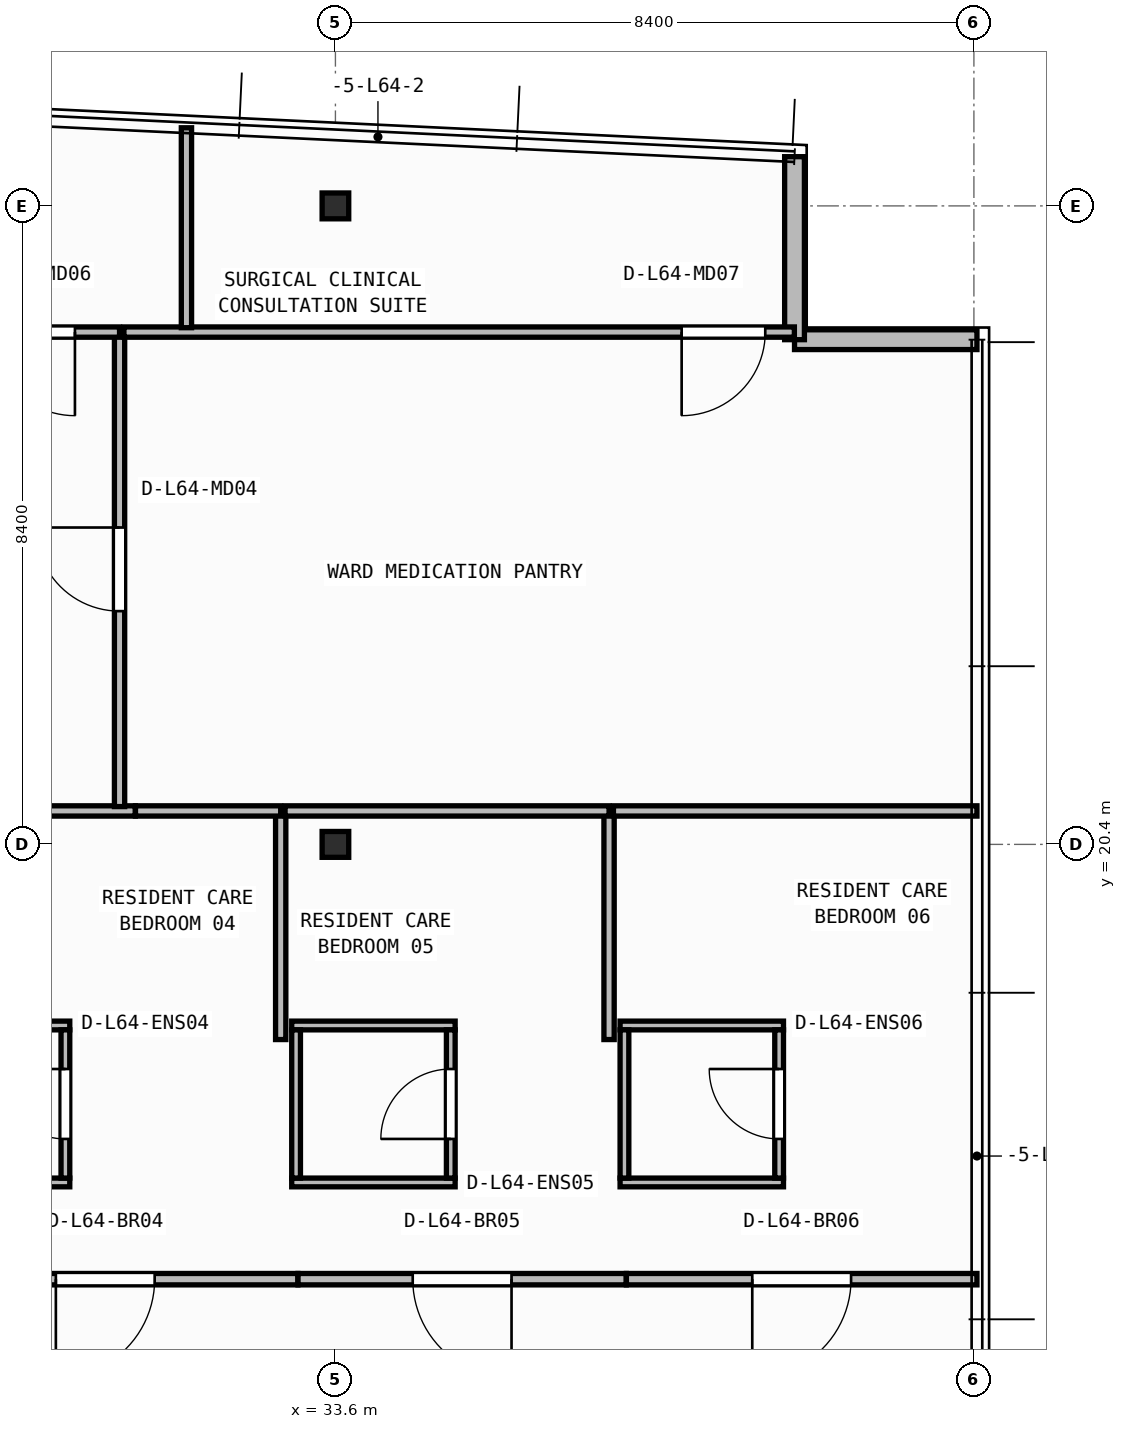
"""IFC4 building model, lengths in metres.
Left out: names, types, materials, properties, quantities, classifications, styles, units other than length and angle.
Written with IfcOpenShell. Run it as: python <this file> out.ifc"""

import sys

from ifc_helpers import new_model, si_unit, direction, frame, frame_2d, origin, origin_2d, place, context, subcontext, project, spatial, rectangle, i_section, extrude, element, fill, save


model = new_model("IFC4")
c1 = context("Model", 3, precision=1e-05, world=origin(), true_north=direction((0.0, 1.0)))
c2 = subcontext(c1, "Body", "Model", "MODEL_VIEW")
j1 = project(units=[si_unit("LENGTHUNIT", "METRE"), si_unit("PLANEANGLEUNIT", "RADIAN")], contexts=[c1])
p1 = place(None, origin())
s1 = spatial("IfcSite", under=j1, at=p1, CompositionType="ELEMENT")
p2 = place(p1, origin())
s2 = spatial("IfcBuilding", under=s1, at=p2, CompositionType="ELEMENT")
p3 = place(p2, frame((0.0, 0.0, 260.5)))
s3 = spatial("IfcBuildingStorey", under=s2, at=p3, CompositionType="ELEMENT", Elevation=260.5)
for number, where, z_axis, x_axis in (
    (1, (33.6, 20.4, 0.0), (0.0, 0.0, 1.0), (1.0, 0.0, 0.0)),
    (2, (33.6, 28.8, 0.0), (0.0, 0.0, 1.0), (1.0, 0.0, 0.0)),
):
    element("IfcColumn", number, at=place(p3, frame(where, z_axis=z_axis, x_axis=x_axis)), inside=s3, PredefinedType="COLUMN", context=c2, shape_type="SweptSolid", body=[
        extrude(i_section(OverallWidth=0.35, OverallDepth=0.34, WebThickness=0.016, FlangeThickness=0.028, at=origin_2d()), origin(), (0.0, 0.0, 1.0), 3.95),
    ])
p4 = place(p3, frame((42.04, 27.04, 0.0), z_axis=(0.0, 0.0, 1.0), x_axis=(-1.0, 0.0, 0.0)))
e3 = element("IfcWall", 3, at=p4, inside=s3, PredefinedType="STANDARD", context=c2, shape_type="SweptSolid", body=[
    extrude(rectangle(XDim=2.4, YDim=0.26, at=frame_2d((1.2, 0.0))), origin(), (0.0, 0.0, 1.0), 3.71),
])
p5 = place(p3, frame((39.64, 27.04, 0.0), z_axis=(0.0, 0.0, 1.0), x_axis=(0.0, 1.0, 0.0)))
e4 = element("IfcWall", 4, at=p5, inside=s3, PredefinedType="STANDARD", context=c2, shape_type="SweptSolid", body=[
    extrude(rectangle(XDim=2.407, YDim=0.26, at=frame_2d((1.204, 0.0))), origin(), (0.0, 0.0, 1.0), 3.71),
])
p6 = place(p3, frame((27.955, 15.952, 0.0), z_axis=(0.0, 0.0, 1.0), x_axis=(1.0, 0.0, 0.0)))
e5 = element("IfcWall", 5, at=p6, inside=s3, PredefinedType="PARTITIONING", context=c2, shape_type="SweptSolid", body=[
    extrude(rectangle(XDim=2.15, YDim=0.115, at=frame_2d((1.075, 0.0))), origin(), (0.0, 0.0, 1.0), 3.429),
])
p7 = place(p3, frame((27.955, 18.018, 0.0), z_axis=(0.0, 0.0, 1.0), x_axis=(1.0, 0.0, 0.0)))
e6 = element("IfcWall", 6, at=p7, inside=s3, PredefinedType="PARTITIONING", context=c2, shape_type="SweptSolid", body=[
    extrude(rectangle(XDim=2.15, YDim=0.115, at=frame_2d((1.075, 0.0))), origin(), (0.0, 0.0, 1.0), 3.71),
])
p8 = place(p3, frame((30.048, 16.01, 0.0), z_axis=(0.0, 0.0, 1.0), x_axis=(0.0, 1.0, 0.0)))
e7 = element("IfcWall", 7, at=p8, inside=s3, PredefinedType="PARTITIONING", context=c2, shape_type="SweptSolid", body=[
    extrude(rectangle(XDim=1.95, YDim=0.115, at=frame_2d((0.975, 0.0))), origin(), (0.0, 0.0, 1.0), 3.71),
])
p9 = place(p8, frame((0.515, 0.0, 0.0)))
e8 = element("IfcOpeningElement", 8, at=p9, cuts=e7, PredefinedType="OPENING", context=c2, shape_type="SweptSolid", body=[
    extrude(rectangle(XDim=0.92, YDim=2.1, at=frame_2d((0.46, 1.05))), frame((0.0, 0.067, 0.0), z_axis=(0.0, -1.0, 0.0), x_axis=(1.0, 0.0, 0.0)), (0.0, 0.0, 1.0), 0.135),
])
p10 = place(p3, frame((33.025, 15.952, 0.0), z_axis=(0.0, 0.0, 1.0), x_axis=(1.0, 0.0, 0.0)))
e9 = element("IfcWall", 9, at=p10, inside=s3, PredefinedType="PARTITIONING", context=c2, shape_type="SweptSolid", body=[
    extrude(rectangle(XDim=2.15, YDim=0.115, at=frame_2d((1.075, 0.0))), origin(), (0.0, 0.0, 1.0), 3.429),
])
p11 = place(p3, frame((33.025, 18.018, 0.0), z_axis=(0.0, 0.0, 1.0), x_axis=(1.0, 0.0, 0.0)))
e10 = element("IfcWall", 10, at=p11, inside=s3, PredefinedType="PARTITIONING", context=c2, shape_type="SweptSolid", body=[
    extrude(rectangle(XDim=2.15, YDim=0.115, at=frame_2d((1.075, 0.0))), origin(), (0.0, 0.0, 1.0), 3.71),
])
p12 = place(p3, frame((33.083, 16.01, 0.0), z_axis=(0.0, 0.0, 1.0), x_axis=(0.0, 1.0, 0.0)))
e11 = element("IfcWall", 11, at=p12, inside=s3, PredefinedType="PARTITIONING", context=c2, shape_type="SweptSolid", body=[
    extrude(rectangle(XDim=1.95, YDim=0.115, at=frame_2d((0.975, 0.0))), origin(), (0.0, 0.0, 1.0), 3.71),
])
p13 = place(p3, frame((35.117, 16.01, 0.0), z_axis=(0.0, 0.0, 1.0), x_axis=(0.0, 1.0, 0.0)))
e12 = element("IfcWall", 12, at=p13, inside=s3, PredefinedType="PARTITIONING", context=c2, shape_type="SweptSolid", body=[
    extrude(rectangle(XDim=1.95, YDim=0.115, at=frame_2d((0.975, 0.0))), origin(), (0.0, 0.0, 1.0), 3.71),
])
p14 = place(p13, frame((0.515, 0.0, 0.0)))
e13 = element("IfcOpeningElement", 13, at=p14, cuts=e12, PredefinedType="OPENING", context=c2, shape_type="SweptSolid", body=[
    extrude(rectangle(XDim=0.92, YDim=2.1, at=frame_2d((0.46, 1.05))), frame((0.0, 0.067, 0.0), z_axis=(0.0, -1.0, 0.0), x_axis=(1.0, 0.0, 0.0)), (0.0, 0.0, 1.0), 0.135),
])
for number, where, z_axis, x_axis in (
    (14, (37.345, 15.952, 0.0), (0.0, 0.0, 1.0), (1.0, 0.0, 0.0)),
    (15, (37.345, 18.018, 0.0), (0.0, 0.0, 1.0), (1.0, 0.0, 0.0)),
):
    element("IfcWall", number, at=place(p3, frame(where, z_axis=z_axis, x_axis=x_axis)), inside=s3, PredefinedType="PARTITIONING", context=c2, shape_type="SweptSolid", body=[
        extrude(rectangle(XDim=2.15, YDim=0.115, at=frame_2d((1.075, 0.0))), origin(), (0.0, 0.0, 1.0), 3.71),
    ])
p15 = place(p3, frame((37.403, 16.01, 0.0), z_axis=(0.0, 0.0, 1.0), x_axis=(0.0, 1.0, 0.0)))
e16 = element("IfcWall", 16, at=p15, inside=s3, PredefinedType="PARTITIONING", context=c2, shape_type="SweptSolid", body=[
    extrude(rectangle(XDim=1.95, YDim=0.115, at=frame_2d((0.975, 0.0))), origin(), (0.0, 0.0, 1.0), 3.71),
])
p16 = place(p3, frame((39.438, 16.01, 0.0), z_axis=(0.0, 0.0, 1.0), x_axis=(0.0, 1.0, 0.0)))
e17 = element("IfcWall", 17, at=p16, inside=s3, PredefinedType="PARTITIONING", context=c2, shape_type="SweptSolid", body=[
    extrude(rectangle(XDim=1.95, YDim=0.115, at=frame_2d((0.975, 0.0))), origin(), (0.0, 0.0, 1.0), 3.71),
])
p17 = place(p16, frame((0.515, 0.0, 0.0)))
e18 = element("IfcOpeningElement", 18, at=p17, cuts=e17, PredefinedType="OPENING", context=c2, shape_type="SweptSolid", body=[
    extrude(rectangle(XDim=0.92, YDim=2.1, at=frame_2d((0.46, 1.05))), frame((0.0, 0.067, 0.0), z_axis=(0.0, -1.0, 0.0), x_axis=(1.0, 0.0, 0.0)), (0.0, 0.0, 1.0), 0.135),
])
p18 = place(p3, frame((33.106, 14.68, 0.0), z_axis=(0.0, 0.0, 1.0), x_axis=(-1.0, 0.0, 0.0)))
e19 = element("IfcWall", 19, at=p18, inside=s3, PredefinedType="PARTITIONING", context=c2, shape_type="SweptSolid", body=[
    extrude(rectangle(XDim=5.068, YDim=0.15, at=frame_2d((2.534, 0.0))), origin(), (0.0, 0.0, 1.0), 3.71),
])
p19 = place(p18, frame((1.884, 0.0, 0.0)))
e20 = element("IfcOpeningElement", 20, at=p19, cuts=e19, PredefinedType="OPENING", context=c2, shape_type="SweptSolid", body=[
    extrude(rectangle(XDim=1.3, YDim=2.15, at=frame_2d((0.65, 1.075))), frame((0.0, 0.085, 0.0), z_axis=(0.0, -1.0, 0.0), x_axis=(1.0, 0.0, 0.0)), (0.0, 0.0, 1.0), 0.17),
])
p20 = place(p3, frame((37.426, 14.68, 0.0), z_axis=(0.0, 0.0, 1.0), x_axis=(-1.0, 0.0, 0.0)))
e21 = element("IfcWall", 21, at=p20, inside=s3, PredefinedType="PARTITIONING", context=c2, shape_type="SweptSolid", body=[
    extrude(rectangle(XDim=4.318, YDim=0.15, at=frame_2d((2.159, 0.0))), origin(), (0.0, 0.0, 1.0), 3.71),
])
p21 = place(p20, frame((1.509, 0.0, 0.0)))
e22 = element("IfcOpeningElement", 22, at=p21, cuts=e21, PredefinedType="OPENING", context=c2, shape_type="SweptSolid", body=[
    extrude(rectangle(XDim=1.3, YDim=2.15, at=frame_2d((0.65, 1.075))), frame((0.0, 0.085, 0.0), z_axis=(0.0, -1.0, 0.0), x_axis=(1.0, 0.0, 0.0)), (0.0, 0.0, 1.0), 0.17),
])
p22 = place(p3, frame((42.04, 14.68, 0.0), z_axis=(0.0, 0.0, 1.0), x_axis=(-1.0, 0.0, 0.0)))
e23 = element("IfcWall", 23, at=p22, inside=s3, PredefinedType="PARTITIONING", context=c2, shape_type="SweptSolid", body=[
    extrude(rectangle(XDim=4.612, YDim=0.15, at=frame_2d((2.306, 0.0))), origin(), (0.0, 0.0, 1.0), 3.71),
])
p23 = place(p22, frame((1.656, 0.0, 0.0)))
e24 = element("IfcOpeningElement", 24, at=p23, cuts=e23, PredefinedType="OPENING", context=c2, shape_type="SweptSolid", body=[
    extrude(rectangle(XDim=1.3, YDim=2.15, at=frame_2d((0.65, 1.075))), frame((0.0, 0.085, 0.0), z_axis=(0.0, -1.0, 0.0), x_axis=(1.0, 0.0, 0.0)), (0.0, 0.0, 1.0), 0.17),
])
p24 = place(p3, frame((32.88, 17.833, 0.0), z_axis=(0.0, 0.0, 1.0), x_axis=(0.0, 1.0, 0.0)))
e25 = element("IfcWall", 25, at=p24, inside=s3, PredefinedType="PARTITIONING", context=c2, shape_type="SweptSolid", body=[
    extrude(rectangle(XDim=3.008, YDim=0.135, at=frame_2d((1.504, 0.0))), origin(), (0.0, 0.0, 1.0), 3.71),
])
p25 = place(p3, frame((30.968, 20.84, 0.0), z_axis=(0.0, 0.0, 1.0), x_axis=(-1.0, 0.0, 0.0)))
e26 = element("IfcWall", 26, at=p25, inside=s3, PredefinedType="PARTITIONING", context=c2, shape_type="SweptSolid", body=[
    extrude(rectangle(XDim=3.1, YDim=0.135, at=frame_2d((1.55, 0.0))), origin(), (0.0, 0.0, 1.0), 3.157),
])
p26 = place(p3, frame((32.88, 20.84, 0.0), z_axis=(0.0, 0.0, 1.0), x_axis=(-1.0, 0.0, 0.0)))
e27 = element("IfcWall", 27, at=p26, inside=s3, PredefinedType="PARTITIONING", context=c2, shape_type="SweptSolid", body=[
    extrude(rectangle(XDim=1.91, YDim=0.135, at=frame_2d((0.955, 0.0))), origin(), (0.0, 0.0, 1.0), 3.157),
])
p27 = place(p3, frame((37.2, 17.833, 0.0), z_axis=(0.0, 0.0, 1.0), x_axis=(0.0, 1.0, 0.0)))
e28 = element("IfcWall", 28, at=p27, inside=s3, PredefinedType="PARTITIONING", context=c2, shape_type="SweptSolid", body=[
    extrude(rectangle(XDim=3.008, YDim=0.135, at=frame_2d((1.504, 0.0))), origin(), (0.0, 0.0, 1.0), 3.71),
])
p28 = place(p3, frame((37.2, 20.84, 0.0), z_axis=(0.0, 0.0, 1.0), x_axis=(-1.0, 0.0, 0.0)))
e29 = element("IfcWall", 29, at=p28, inside=s3, PredefinedType="PARTITIONING", context=c2, shape_type="SweptSolid", body=[
    extrude(rectangle(XDim=4.262, YDim=0.135, at=frame_2d((2.131, 0.0))), origin(), (0.0, 0.0, 1.0), 3.157),
])
p29 = place(p3, frame((42.04, 20.84, 0.0), z_axis=(0.0, 0.0, 1.0), x_axis=(-1.0, 0.0, 0.0)))
e30 = element("IfcWall", 30, at=p29, inside=s3, PredefinedType="PARTITIONING", context=c2, shape_type="SweptSolid", body=[
    extrude(rectangle(XDim=4.782, YDim=0.135, at=frame_2d((2.391, 0.0))), origin(), (0.0, 0.0, 1.0), 3.71),
])
p30 = place(p3, frame((30.76, 20.897, 0.0), z_axis=(0.0, 0.0, 1.0), x_axis=(0.0, 1.0, 0.0)))
e31 = element("IfcWall", 31, at=p30, inside=s3, PredefinedType="PARTITIONING", context=c2, shape_type="SweptSolid", body=[
    extrude(rectangle(XDim=6.242, YDim=0.135, at=frame_2d((3.121, 0.0))), origin(), (0.0, 0.0, 1.0), 3.71),
])
p31 = place(p30, frame((2.571, 0.0, 0.0)))
e32 = element("IfcOpeningElement", 32, at=p31, cuts=e31, PredefinedType="OPENING", context=c2, shape_type="SweptSolid", body=[
    extrude(rectangle(XDim=1.1, YDim=2.1, at=frame_2d((0.55, 1.05))), frame((0.0, 0.077, 0.0), z_axis=(0.0, -1.0, 0.0), x_axis=(1.0, 0.0, 0.0)), (0.0, 0.0, 1.0), 0.155),
])
p32 = place(p3, frame((30.76, 27.14, 0.0), z_axis=(0.0, 0.0, 1.0), x_axis=(-1.0, 0.0, 0.0)))
e33 = element("IfcWall", 33, at=p32, inside=s3, PredefinedType="PARTITIONING", context=c2, shape_type="SweptSolid", body=[
    extrude(rectangle(XDim=16.98, YDim=0.135, at=frame_2d((8.49, 0.0))), origin(), (0.0, 0.0, 1.0), 3.71),
])
p33 = place(p32, frame((0.587, 0.0, 0.0)))
e34 = element("IfcOpeningElement", 34, at=p33, cuts=e33, PredefinedType="OPENING", context=c2, shape_type="SweptSolid", body=[
    extrude(rectangle(XDim=1.1, YDim=2.1, at=frame_2d((0.55, 1.05))), frame((0.0, 0.077, 0.0), z_axis=(0.0, -1.0, 0.0), x_axis=(1.0, 0.0, 0.0)), (0.0, 0.0, 1.0), 0.155),
])
p34 = place(p3, frame((39.638, 27.14, 0.0), z_axis=(0.0, 0.0, 1.0), x_axis=(-1.0, 0.0, 0.0)))
e35 = element("IfcWall", 35, at=p34, inside=s3, PredefinedType="PARTITIONING", context=c2, shape_type="SweptSolid", body=[
    extrude(rectangle(XDim=8.821, YDim=0.135, at=frame_2d((4.41, 0.0))), origin(), (0.0, 0.0, 1.0), 3.71),
])
p35 = place(p34, frame((0.383, 0.0, 0.0)))
e36 = element("IfcOpeningElement", 36, at=p35, cuts=e35, PredefinedType="OPENING", context=c2, shape_type="SweptSolid", body=[
    extrude(rectangle(XDim=1.1, YDim=2.1, at=frame_2d((0.55, 1.05))), frame((0.0, 0.077, 0.0), z_axis=(0.0, -1.0, 0.0), x_axis=(1.0, 0.0, 0.0)), (0.0, 0.0, 1.0), 0.155),
])
p36 = place(p3, frame((31.64, 27.198, 0.0), z_axis=(0.0, 0.0, 1.0), x_axis=(0.0, 1.0, 0.0)))
e37 = element("IfcWall", 37, at=p36, inside=s3, PredefinedType="PARTITIONING", context=c2, shape_type="SweptSolid", body=[
    extrude(rectangle(XDim=2.63, YDim=0.135, at=frame_2d((1.315, 0.0))), origin(), (0.0, 0.0, 1.0), 3.71),
])
p37 = place(p9, origin())
e38 = element("IfcDoor", 38, at=p37, inside=s3, OperationType="SINGLE_SWING_RIGHT", PredefinedType="DOOR", context=c2, shape_type="SweptSolid", body=[
    extrude(rectangle(XDim=0.92, YDim=2.1, at=frame_2d((0.46, 1.05))), frame((0.0, 0.025, 0.0), z_axis=(0.0, -1.0, 0.0), x_axis=(1.0, 0.0, 0.0)), (0.0, 0.0, 1.0), 0.05),
])
fill(e8, e38)
p38 = place(p14, origin())
e39 = element("IfcDoor", 39, at=p38, inside=s3, OperationType="SINGLE_SWING_LEFT", PredefinedType="DOOR", context=c2, shape_type="SweptSolid", body=[
    extrude(rectangle(XDim=0.92, YDim=2.1, at=frame_2d((0.46, 1.05))), frame((0.0, 0.025, 0.0), z_axis=(0.0, -1.0, 0.0), x_axis=(1.0, 0.0, 0.0)), (0.0, 0.0, 1.0), 0.05),
])
fill(e13, e39)
p39 = place(p17, origin())
e40 = element("IfcDoor", 40, at=p39, inside=s3, OperationType="SINGLE_SWING_RIGHT", PredefinedType="DOOR", context=c2, shape_type="SweptSolid", body=[
    extrude(rectangle(XDim=0.92, YDim=2.1, at=frame_2d((0.46, 1.05))), frame((0.0, 0.025, 0.0), z_axis=(0.0, -1.0, 0.0), x_axis=(1.0, 0.0, 0.0)), (0.0, 0.0, 1.0), 0.05),
])
fill(e18, e40)
p40 = place(p19, origin())
e41 = element("IfcDoor", 41, at=p40, inside=s3, OperationType="SINGLE_SWING_RIGHT", PredefinedType="DOOR", context=c2, shape_type="SweptSolid", body=[
    extrude(rectangle(XDim=1.3, YDim=2.15, at=frame_2d((0.65, 1.075))), frame((0.0, 0.025, 0.0), z_axis=(0.0, -1.0, 0.0), x_axis=(1.0, 0.0, 0.0)), (0.0, 0.0, 1.0), 0.05),
])
fill(e20, e41)
p41 = place(p21, origin())
e42 = element("IfcDoor", 42, at=p41, inside=s3, OperationType="SINGLE_SWING_LEFT", PredefinedType="DOOR", context=c2, shape_type="SweptSolid", body=[
    extrude(rectangle(XDim=1.3, YDim=2.15, at=frame_2d((0.65, 1.075))), frame((0.0, 0.025, 0.0), z_axis=(0.0, -1.0, 0.0), x_axis=(1.0, 0.0, 0.0)), (0.0, 0.0, 1.0), 0.05),
])
fill(e22, e42)
p42 = place(p23, origin())
e43 = element("IfcDoor", 43, at=p42, inside=s3, OperationType="SINGLE_SWING_RIGHT", PredefinedType="DOOR", context=c2, shape_type="SweptSolid", body=[
    extrude(rectangle(XDim=1.3, YDim=2.15, at=frame_2d((0.65, 1.075))), frame((0.0, 0.025, 0.0), z_axis=(0.0, -1.0, 0.0), x_axis=(1.0, 0.0, 0.0)), (0.0, 0.0, 1.0), 0.05),
])
fill(e24, e43)
p43 = place(p31, origin())
e44 = element("IfcDoor", 44, at=p43, inside=s3, OperationType="SINGLE_SWING_RIGHT", PredefinedType="DOOR", context=c2, shape_type="SweptSolid", body=[
    extrude(rectangle(XDim=1.1, YDim=2.1, at=frame_2d((0.55, 1.05))), frame((0.0, 0.025, 0.0), z_axis=(0.0, -1.0, 0.0), x_axis=(1.0, 0.0, 0.0)), (0.0, 0.0, 1.0), 0.05),
])
fill(e32, e44)
p44 = place(p33, origin())
e45 = element("IfcDoor", 45, at=p44, inside=s3, OperationType="SINGLE_SWING_LEFT", PredefinedType="DOOR", context=c2, shape_type="SweptSolid", body=[
    extrude(rectangle(XDim=1.1, YDim=2.1, at=frame_2d((0.55, 1.05))), frame((0.0, 0.025, 0.0), z_axis=(0.0, -1.0, 0.0), x_axis=(1.0, 0.0, 0.0)), (0.0, 0.0, 1.0), 0.05),
])
fill(e34, e45)
p45 = place(p35, origin())
e46 = element("IfcDoor", 46, at=p45, inside=s3, OperationType="SINGLE_SWING_RIGHT", PredefinedType="DOOR", context=c2, shape_type="SweptSolid", body=[
    extrude(rectangle(XDim=1.1, YDim=2.1, at=frame_2d((0.55, 1.05))), frame((0.0, 0.025, 0.0), z_axis=(0.0, -1.0, 0.0), x_axis=(1.0, 0.0, 0.0)), (0.0, 0.0, 1.0), 0.05),
])
fill(e36, e46)
save(model, sys.argv[1])
